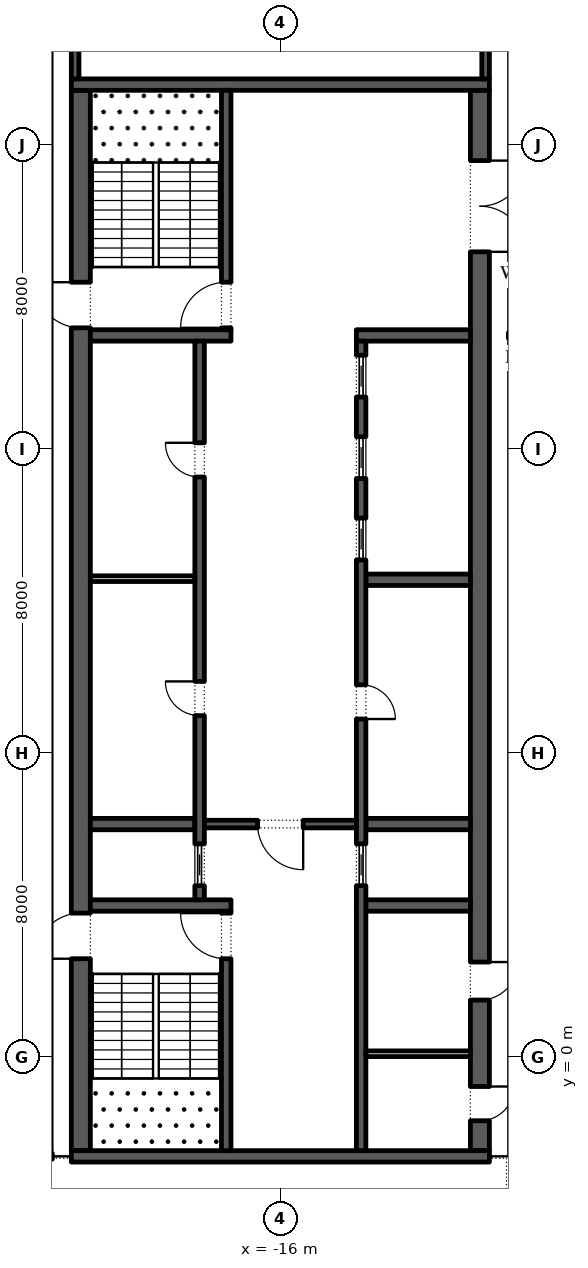
"""IFC4 building model, lengths in metres.
Left out: names, types, materials, properties, quantities, classifications, styles, units other than length and angle.
Written with IfcOpenShell. Run it as: python <this file> out.ifc"""

import sys

from ifc_helpers import new_model, si_unit, direction, frame, frame_2d, origin, place, context, subcontext, project, spatial, rectangle, extrude, element, fill, save


model = new_model("IFC4")
c1 = context("Model", 3, precision=1e-05, world=origin(), true_north=direction((0.0, 1.0)))
c2 = subcontext(c1, "Body", "Model", "MODEL_VIEW")
j1 = project(units=[si_unit("LENGTHUNIT", "METRE"), si_unit("PLANEANGLEUNIT", "RADIAN")], contexts=[c1])
p1 = place(None, origin())
s1 = spatial("IfcSite", under=j1, at=p1, CompositionType="ELEMENT")
p2 = place(p1, origin())
s2 = spatial("IfcBuilding", under=s1, at=p2, CompositionType="ELEMENT")
p3 = place(p2, frame((0.0, 0.0, 338.4)))
s3 = spatial("IfcBuildingStorey", under=s2, at=p3, CompositionType="ELEMENT", Elevation=338.4)
p4 = place(p3, frame((-21.25, -2.45, 0.0), z_axis=(0.0, 0.0, 1.0), x_axis=(0.0, 1.0, 0.0)))
e1 = element("IfcWall", 1, at=p4, inside=s3, PredefinedType="SHEAR", context=c2, shape_type="SweptSolid", body=[
    extrude(rectangle(XDim=27.9, YDim=0.5, at=frame_2d((13.95, 0.0))), origin(), (0.0, 0.0, 1.0), 4.0),
])
p5 = place(p4, frame((5.05, 0.0, 0.0)))
e2 = element("IfcOpeningElement", 2, at=p5, cuts=e1, PredefinedType="OPENING", context=c2, shape_type="SweptSolid", body=[
    extrude(rectangle(XDim=1.2, YDim=2.1, at=frame_2d((0.6, 1.05))), frame((0.0, 0.26, 0.0), z_axis=(0.0, -1.0, 0.0), x_axis=(1.0, 0.0, 0.0)), (0.0, 0.0, 1.0), 0.52),
])
p6 = place(p4, frame((21.65, 0.0, 0.0)))
e3 = element("IfcOpeningElement", 3, at=p6, cuts=e1, PredefinedType="OPENING", context=c2, shape_type="SweptSolid", body=[
    extrude(rectangle(XDim=1.2, YDim=2.1, at=frame_2d((0.6, 1.05))), frame((0.0, 0.26, 0.0), z_axis=(0.0, -1.0, 0.0), x_axis=(1.0, 0.0, 0.0)), (0.0, 0.0, 1.0), 0.52),
])
p7 = place(p3, frame((-10.75, -2.45, 0.0), z_axis=(0.0, 0.0, 1.0), x_axis=(0.0, 1.0, 0.0)))
e4 = element("IfcWall", 4, at=p7, inside=s3, PredefinedType="SHEAR", context=c2, shape_type="SweptSolid", body=[
    extrude(rectangle(XDim=27.9, YDim=0.5, at=frame_2d((13.95, 0.0))), origin(), (0.0, 0.0, 1.0), 4.0),
])
p8 = place(p7, frame((23.65, 0.0, 0.0)))
e5 = element("IfcOpeningElement", 5, at=p8, cuts=e4, PredefinedType="OPENING", context=c2, shape_type="SweptSolid", body=[
    extrude(rectangle(XDim=2.4, YDim=2.1, at=frame_2d((1.2, 1.05))), frame((0.0, 0.26, 0.0), z_axis=(0.0, -1.0, 0.0), x_axis=(1.0, 0.0, 0.0)), (0.0, 0.0, 1.0), 0.52),
])
p9 = place(p7, frame((0.788, 0.0, 0.0)))
e6 = element("IfcOpeningElement", 6, at=p9, cuts=e4, PredefinedType="OPENING", context=c2, shape_type="SweptSolid", body=[
    extrude(rectangle(XDim=0.9, YDim=2.1, at=frame_2d((0.45, 1.05))), frame((0.0, 0.26, 0.0), z_axis=(0.0, -1.0, 0.0), x_axis=(1.0, 0.0, 0.0)), (0.0, 0.0, 1.0), 0.52),
])
p10 = place(p7, frame((3.962, 0.0, 0.0)))
e7 = element("IfcOpeningElement", 7, at=p10, cuts=e4, PredefinedType="OPENING", context=c2, shape_type="SweptSolid", body=[
    extrude(rectangle(XDim=1.0, YDim=2.1, at=frame_2d((0.5, 1.05))), frame((0.0, 0.26, 0.0), z_axis=(0.0, -1.0, 0.0), x_axis=(1.0, 0.0, 0.0)), (0.0, 0.0, 1.0), 0.52),
])
for number, where, z_axis, x_axis in (
    (8, (-21.5, -2.6, 0.0), (0.0, 0.0, 1.0), (1.0, 0.0, 0.0)),
    (9, (-21.5, 25.6, 0.0), (0.0, 0.0, 1.0), (1.0, 0.0, 0.0)),
):
    element("IfcWall", number, at=place(p3, frame(where, z_axis=z_axis, x_axis=x_axis)), inside=s3, PredefinedType="SHEAR", context=c2, shape_type="SweptSolid", body=[
        extrude(rectangle(XDim=11.0, YDim=0.3, at=frame_2d((5.5, 0.0))), origin(), (0.0, 0.0, 1.0), 4.0),
    ])
p11 = place(p3, frame((-21.0, 4.0, 0.0), z_axis=(0.0, 0.0, 1.0), x_axis=(1.0, 0.0, 0.0)))
e10 = element("IfcWall", 10, at=p11, inside=s3, PredefinedType="SHEAR", context=c2, shape_type="SweptSolid", body=[
    extrude(rectangle(XDim=3.7, YDim=0.3, at=frame_2d((1.85, 0.0))), origin(), (0.0, 0.0, 1.0), 4.0),
])
p12 = place(p3, frame((-17.425, -2.45, 0.0), z_axis=(0.0, 0.0, 1.0), x_axis=(0.0, 1.0, 0.0)))
e11 = element("IfcWall", 11, at=p12, inside=s3, PredefinedType="SHEAR", context=c2, shape_type="SweptSolid", body=[
    extrude(rectangle(XDim=6.3, YDim=0.25, at=frame_2d((3.15, 0.0))), origin(), (0.0, 0.0, 1.0), 4.0),
])
p13 = place(p12, frame((5.05, 0.0, 0.0)))
e12 = element("IfcOpeningElement", 12, at=p13, cuts=e11, PredefinedType="OPENING", context=c2, shape_type="SweptSolid", body=[
    extrude(rectangle(XDim=1.2, YDim=2.1, at=frame_2d((0.6, 1.05))), frame((0.0, 0.135, 0.0), z_axis=(0.0, -1.0, 0.0), x_axis=(1.0, 0.0, 0.0)), (0.0, 0.0, 1.0), 0.27),
])
p14 = place(p3, frame((-21.0, 19.0, 0.0), z_axis=(0.0, 0.0, 1.0), x_axis=(1.0, 0.0, 0.0)))
e13 = element("IfcWall", 13, at=p14, inside=s3, PredefinedType="SHEAR", context=c2, shape_type="SweptSolid", body=[
    extrude(rectangle(XDim=3.7, YDim=0.3, at=frame_2d((1.85, 0.0))), origin(), (0.0, 0.0, 1.0), 4.0),
])
p15 = place(p3, frame((-17.425, 19.15, 0.0), z_axis=(0.0, 0.0, 1.0), x_axis=(0.0, 1.0, 0.0)))
e14 = element("IfcWall", 14, at=p15, inside=s3, PredefinedType="SHEAR", context=c2, shape_type="SweptSolid", body=[
    extrude(rectangle(XDim=6.3, YDim=0.25, at=frame_2d((3.15, 0.0))), origin(), (0.0, 0.0, 1.0), 4.0),
])
p16 = place(p15, frame((0.05, 0.0, 0.0)))
e15 = element("IfcOpeningElement", 15, at=p16, cuts=e14, PredefinedType="OPENING", context=c2, shape_type="SweptSolid", body=[
    extrude(rectangle(XDim=1.2, YDim=2.1, at=frame_2d((0.6, 1.05))), frame((0.0, 0.135, 0.0), z_axis=(0.0, -1.0, 0.0), x_axis=(1.0, 0.0, 0.0)), (0.0, 0.0, 1.0), 0.27),
])
p17 = place(p3, frame((-21.0, 6.143, 0.0), z_axis=(0.0, 0.0, 1.0), x_axis=(1.0, 0.0, 0.0)))
e16 = element("IfcWall", 16, at=p17, inside=s3, PredefinedType="SHEAR", context=c2, shape_type="SweptSolid", body=[
    extrude(rectangle(XDim=2.75, YDim=0.3, at=frame_2d((1.375, 0.0))), origin(), (0.0, 0.0, 1.0), 4.0),
])
p18 = place(p3, frame((-18.125, 4.15, 0.0), z_axis=(0.0, 0.0, 1.0), x_axis=(0.0, 1.0, 0.0)))
e17 = element("IfcWall", 17, at=p18, inside=s3, PredefinedType="SHEAR", context=c2, shape_type="SweptSolid", body=[
    extrude(rectangle(XDim=14.7, YDim=0.25, at=frame_2d((7.35, 0.0))), origin(), (0.0, 0.0, 1.0), 4.0),
])
p19 = place(p18, frame((4.846, 0.0, 0.0)))
e18 = element("IfcOpeningElement", 18, at=p19, cuts=e17, PredefinedType="OPENING", context=c2, shape_type="SweptSolid", body=[
    extrude(rectangle(XDim=0.9, YDim=2.1, at=frame_2d((0.45, 1.05))), frame((0.0, 0.135, 0.0), z_axis=(0.0, -1.0, 0.0), x_axis=(1.0, 0.0, 0.0)), (0.0, 0.0, 1.0), 0.27),
])
p20 = place(p18, frame((11.125, 0.0, 0.0)))
e19 = element("IfcOpeningElement", 19, at=p20, cuts=e17, PredefinedType="OPENING", context=c2, shape_type="SweptSolid", body=[
    extrude(rectangle(XDim=0.9, YDim=2.1, at=frame_2d((0.45, 1.05))), frame((0.0, 0.135, 0.0), z_axis=(0.0, -1.0, 0.0), x_axis=(1.0, 0.0, 0.0)), (0.0, 0.0, 1.0), 0.27),
])
p21 = place(p18, frame((0.371, 0.0, 0.0)))
e20 = element("IfcOpeningElement", 20, at=p21, cuts=e17, PredefinedType="OPENING", context=c2, shape_type="SweptSolid", body=[
    extrude(rectangle(XDim=1.1, YDim=2.1, at=frame_2d((0.55, 1.05))), frame((0.0, 0.135, 0.0), z_axis=(0.0, -1.0, 0.0), x_axis=(1.0, 0.0, 0.0)), (0.0, 0.0, 1.0), 0.27),
])
p22 = place(p3, frame((-21.0, 12.6, 0.0), z_axis=(0.0, 0.0, 1.0), x_axis=(1.0, 0.0, 0.0)))
e21 = element("IfcWall", 21, at=p22, inside=s3, PredefinedType="PARTITIONING", context=c2, shape_type="SweptSolid", body=[
    extrude(rectangle(XDim=2.75, YDim=0.15, at=frame_2d((1.375, 0.0))), origin(), (0.0, 0.0, 1.0), 4.0),
])
p23 = place(p3, frame((-14.0, 4.0, 0.0), z_axis=(0.0, 0.0, 1.0), x_axis=(1.0, 0.0, 0.0)))
e22 = element("IfcWall", 22, at=p23, inside=s3, PredefinedType="SHEAR", context=c2, shape_type="SweptSolid", body=[
    extrude(rectangle(XDim=3.0, YDim=0.3, at=frame_2d((1.5, 0.0))), origin(), (0.0, 0.0, 1.0), 4.0),
])
for number, where, z_axis, x_axis in (
    (23, (-13.75, 6.143, 0.0), (0.0, 0.0, 1.0), (1.0, 0.0, 0.0)),
    (24, (-13.75, 12.571, 0.0), (0.0, 0.0, 1.0), (1.0, 0.0, 0.0)),
):
    element("IfcWall", number, at=place(p3, frame(where, z_axis=z_axis, x_axis=x_axis)), inside=s3, PredefinedType="SHEAR", context=c2, shape_type="SweptSolid", body=[
        extrude(rectangle(XDim=2.75, YDim=0.3, at=frame_2d((1.375, 0.0))), origin(), (0.0, 0.0, 1.0), 4.0),
    ])
p24 = place(p3, frame((-14.0, 19.0, 0.0), z_axis=(0.0, 0.0, 1.0), x_axis=(1.0, 0.0, 0.0)))
e25 = element("IfcWall", 25, at=p24, inside=s3, PredefinedType="SHEAR", context=c2, shape_type="SweptSolid", body=[
    extrude(rectangle(XDim=3.0, YDim=0.3, at=frame_2d((1.5, 0.0))), origin(), (0.0, 0.0, 1.0), 4.0),
])
p25 = place(p3, frame((-13.875, -2.45, 0.0), z_axis=(0.0, 0.0, 1.0), x_axis=(0.0, 1.0, 0.0)))
e26 = element("IfcWall", 26, at=p25, inside=s3, PredefinedType="SHEAR", context=c2, shape_type="SweptSolid", body=[
    extrude(rectangle(XDim=21.3, YDim=0.25, at=frame_2d((10.65, 0.0))), origin(), (0.0, 0.0, 1.0), 4.0),
])
p26 = place(p25, frame((11.357, 0.0, 0.0)))
e27 = element("IfcOpeningElement", 27, at=p26, cuts=e26, PredefinedType="OPENING", context=c2, shape_type="SweptSolid", body=[
    extrude(rectangle(XDim=0.9, YDim=2.1, at=frame_2d((0.45, 1.05))), frame((0.0, 0.135, 0.0), z_axis=(0.0, -1.0, 0.0), x_axis=(1.0, 0.0, 0.0)), (0.0, 0.0, 1.0), 0.27),
])
p27 = place(p25, frame((6.971, 0.0, 0.0)))
e28 = element("IfcOpeningElement", 28, at=p27, cuts=e26, PredefinedType="OPENING", context=c2, shape_type="SweptSolid", body=[
    extrude(rectangle(XDim=1.1, YDim=2.1, at=frame_2d((0.55, 1.05))), frame((0.0, 0.135, 0.0), z_axis=(0.0, -1.0, 0.0), x_axis=(1.0, 0.0, 0.0)), (0.0, 0.0, 1.0), 0.27),
])
p28 = place(p25, frame((15.543, 0.0, 0.0)))
e29 = element("IfcOpeningElement", 29, at=p28, cuts=e26, PredefinedType="OPENING", context=c2, shape_type="SweptSolid", body=[
    extrude(rectangle(XDim=1.1, YDim=2.1, at=frame_2d((0.55, 1.05))), frame((0.0, 0.135, 0.0), z_axis=(0.0, -1.0, 0.0), x_axis=(1.0, 0.0, 0.0)), (0.0, 0.0, 1.0), 0.27),
])
p29 = place(p25, frame((17.686, 0.0, 0.0)))
e30 = element("IfcOpeningElement", 30, at=p29, cuts=e26, PredefinedType="OPENING", context=c2, shape_type="SweptSolid", body=[
    extrude(rectangle(XDim=1.1, YDim=2.1, at=frame_2d((0.55, 1.05))), frame((0.0, 0.135, 0.0), z_axis=(0.0, -1.0, 0.0), x_axis=(1.0, 0.0, 0.0)), (0.0, 0.0, 1.0), 0.27),
])
p30 = place(p25, frame((19.829, 0.0, 0.0)))
e31 = element("IfcOpeningElement", 31, at=p30, cuts=e26, PredefinedType="OPENING", context=c2, shape_type="SweptSolid", body=[
    extrude(rectangle(XDim=1.1, YDim=2.1, at=frame_2d((0.55, 1.05))), frame((0.0, 0.135, 0.0), z_axis=(0.0, -1.0, 0.0), x_axis=(1.0, 0.0, 0.0)), (0.0, 0.0, 1.0), 0.27),
])
p31 = place(p3, frame((-18.0, 6.143, 0.0), z_axis=(0.0, 0.0, 1.0), x_axis=(1.0, 0.0, 0.0)))
e32 = element("IfcWall", 32, at=p31, inside=s3, PredefinedType="SHEAR", context=c2, shape_type="SweptSolid", body=[
    extrude(rectangle(XDim=4.0, YDim=0.2, at=frame_2d((2.0, 0.0))), origin(), (0.0, 0.0, 1.0), 4.0),
])
p32 = place(p31, frame((1.4, 0.0, 0.0)))
e33 = element("IfcOpeningElement", 33, at=p32, cuts=e32, PredefinedType="OPENING", context=c2, shape_type="SweptSolid", body=[
    extrude(rectangle(XDim=1.2, YDim=2.1, at=frame_2d((0.6, 1.05))), frame((0.0, 0.11, 0.0), z_axis=(0.0, -1.0, 0.0), x_axis=(1.0, 0.0, 0.0)), (0.0, 0.0, 1.0), 0.22),
])
p33 = place(p3, frame((-13.75, 0.1, 0.0), z_axis=(0.0, 0.0, 1.0), x_axis=(1.0, 0.0, 0.0)))
e34 = element("IfcWall", 34, at=p33, inside=s3, PredefinedType="PARTITIONING", context=c2, shape_type="SweptSolid", body=[
    extrude(rectangle(XDim=2.75, YDim=0.15, at=frame_2d((1.375, 0.0))), origin(), (0.0, 0.0, 1.0), 4.0),
])
p34 = place(p3, frame((-21.4, 25.75, 0.0), z_axis=(0.0, 0.0, 1.0), x_axis=(0.0, 1.0, 0.0)))
e35 = element("IfcWall", 35, at=p34, inside=s3, PredefinedType="SHEAR", context=c2, shape_type="SweptSolid", body=[
    extrude(rectangle(XDim=15.05, YDim=0.2, at=frame_2d((7.525, 0.0))), origin(), (0.0, 0.0, 1.0), 4.0),
])
p35 = place(p3, frame((-10.6, 25.75, 0.0), z_axis=(0.0, 0.0, 1.0), x_axis=(0.0, 1.0, 0.0)))
e36 = element("IfcWall", 36, at=p35, inside=s3, PredefinedType="SHEAR", context=c2, shape_type="SweptSolid", body=[
    extrude(rectangle(XDim=15.05, YDim=0.2, at=frame_2d((7.525, 0.0))), origin(), (0.0, 0.0, 1.0), 4.0),
])
p36 = place(p35, frame((7.075, 0.0, 0.0)))
e37 = element("IfcOpeningElement", 37, at=p36, cuts=e36, PredefinedType="OPENING", context=c2, shape_type="SweptSolid", body=[
    extrude(rectangle(XDim=0.9, YDim=2.1, at=frame_2d((0.45, 1.05))), frame((0.0, 0.11, 0.0), z_axis=(0.0, -1.0, 0.0), x_axis=(1.0, 0.0, 0.0)), (0.0, 0.0, 1.0), 0.22),
])
p37 = place(p3, frame((-10.0, 19.0, 0.0), z_axis=(0.0, 0.0, 1.0), x_axis=(1.0, 0.0, 0.0)))
e38 = element("IfcWall", 38, at=p37, inside=s3, PredefinedType="PARTITIONING", context=c2, shape_type="SweptSolid", body=[
    extrude(rectangle(XDim=1.515, YDim=0.15, at=frame_2d((0.757, 0.0))), origin(), (0.0, 0.0, 1.0), 4.0),
])
p38 = place(p37, frame((0.258, 0.0, 0.0)))
e39 = element("IfcOpeningElement", 39, at=p38, cuts=e38, PredefinedType="OPENING", context=c2, shape_type="SweptSolid", body=[
    extrude(rectangle(XDim=1.0, YDim=2.1, at=frame_2d((0.5, 1.05))), frame((0.0, 0.085, 0.0), z_axis=(0.0, -1.0, 0.0), x_axis=(1.0, 0.0, 0.0)), (0.0, 0.0, 1.0), 0.17),
])
p39 = place(p19, origin())
e40 = element("IfcDoor", 40, at=p39, inside=s3, OperationType="SINGLE_SWING_LEFT", PredefinedType="DOOR", context=c2, shape_type="SweptSolid", body=[
    extrude(rectangle(XDim=0.9, YDim=2.1, at=frame_2d((0.45, 1.05))), frame((0.0, 0.125, 0.0), z_axis=(0.0, -1.0, 0.0), x_axis=(1.0, 0.0, 0.0)), (0.0, 0.0, 1.0), 0.05),
])
fill(e18, e40)
p40 = place(p20, origin())
e41 = element("IfcDoor", 41, at=p40, inside=s3, OperationType="SINGLE_SWING_LEFT", PredefinedType="DOOR", context=c2, shape_type="SweptSolid", body=[
    extrude(rectangle(XDim=0.9, YDim=2.1, at=frame_2d((0.45, 1.05))), frame((0.0, 0.125, 0.0), z_axis=(0.0, -1.0, 0.0), x_axis=(1.0, 0.0, 0.0)), (0.0, 0.0, 1.0), 0.05),
])
fill(e19, e41)
p41 = place(p21, origin())
e42 = element("IfcDoor", 42, at=p41, inside=s3, OperationType="SLIDING_TO_LEFT", PredefinedType="DOOR", context=c2, shape_type="SweptSolid", body=[
    extrude(rectangle(XDim=1.1, YDim=2.1, at=frame_2d((0.55, 1.05))), frame((0.0, 0.025, 0.0), z_axis=(0.0, -1.0, 0.0), x_axis=(1.0, 0.0, 0.0)), (0.0, 0.0, 1.0), 0.05),
])
fill(e20, e42)
p42 = place(p26, frame((0.9, -0.2, 0.0), z_axis=(0.0, 0.0, 1.0), x_axis=(-1.0, 0.0, 0.0)))
e43 = element("IfcDoor", 43, at=p42, inside=s3, OperationType="SINGLE_SWING_LEFT", PredefinedType="DOOR", context=c2, shape_type="SweptSolid", body=[
    extrude(rectangle(XDim=0.9, YDim=2.1, at=frame_2d((0.45, 1.05))), frame((0.0, -0.075, 0.0), z_axis=(0.0, -1.0, 0.0), x_axis=(1.0, 0.0, 0.0)), (0.0, 0.0, 1.0), 0.05),
])
fill(e27, e43)
p43 = place(p27, origin())
e44 = element("IfcDoor", 44, at=p43, inside=s3, OperationType="SLIDING_TO_LEFT", PredefinedType="DOOR", context=c2, shape_type="SweptSolid", body=[
    extrude(rectangle(XDim=1.1, YDim=2.1, at=frame_2d((0.55, 1.05))), frame((0.0, 0.025, 0.0), z_axis=(0.0, -1.0, 0.0), x_axis=(1.0, 0.0, 0.0)), (0.0, 0.0, 1.0), 0.05),
])
fill(e28, e44)
p44 = place(p28, origin())
e45 = element("IfcDoor", 45, at=p44, inside=s3, OperationType="SLIDING_TO_LEFT", PredefinedType="DOOR", context=c2, shape_type="SweptSolid", body=[
    extrude(rectangle(XDim=1.1, YDim=2.1, at=frame_2d((0.55, 1.05))), frame((0.0, 0.025, 0.0), z_axis=(0.0, -1.0, 0.0), x_axis=(1.0, 0.0, 0.0)), (0.0, 0.0, 1.0), 0.05),
])
fill(e29, e45)
p45 = place(p29, origin())
e46 = element("IfcDoor", 46, at=p45, inside=s3, OperationType="SLIDING_TO_LEFT", PredefinedType="DOOR", context=c2, shape_type="SweptSolid", body=[
    extrude(rectangle(XDim=1.1, YDim=2.1, at=frame_2d((0.55, 1.05))), frame((0.0, 0.025, 0.0), z_axis=(0.0, -1.0, 0.0), x_axis=(1.0, 0.0, 0.0)), (0.0, 0.0, 1.0), 0.05),
])
fill(e30, e46)
p46 = place(p30, origin())
e47 = element("IfcDoor", 47, at=p46, inside=s3, OperationType="SLIDING_TO_LEFT", PredefinedType="DOOR", context=c2, shape_type="SweptSolid", body=[
    extrude(rectangle(XDim=1.1, YDim=2.1, at=frame_2d((0.55, 1.05))), frame((0.0, 0.025, 0.0), z_axis=(0.0, -1.0, 0.0), x_axis=(1.0, 0.0, 0.0)), (0.0, 0.0, 1.0), 0.05),
])
fill(e31, e47)
p47 = place(p32, frame((1.2, 0.0, 0.0), z_axis=(0.0, 0.0, 1.0), x_axis=(-1.0, 0.0, 0.0)))
e48 = element("IfcDoor", 48, at=p47, inside=s3, OperationType="SINGLE_SWING_RIGHT", PredefinedType="DOOR", context=c2, shape_type="SweptSolid", body=[
    extrude(rectangle(XDim=1.2, YDim=2.1, at=frame_2d((0.6, 1.05))), frame((0.0, 0.025, 0.0), z_axis=(0.0, -1.0, 0.0), x_axis=(1.0, 0.0, 0.0)), (0.0, 0.0, 1.0), 0.05),
])
fill(e33, e48)
p48 = place(p8, frame((2.4, 0.0, 0.0), z_axis=(0.0, 0.0, 1.0), x_axis=(-1.0, 0.0, 0.0)))
e49 = element("IfcDoor", 49, at=p48, inside=s3, OperationType="DOUBLE_DOOR_SINGLE_SWING", PredefinedType="DOOR", context=c2, shape_type="SweptSolid", body=[
    extrude(rectangle(XDim=2.4, YDim=2.1, at=frame_2d((1.2, 1.05))), frame((0.0, 0.025, 0.0), z_axis=(0.0, -1.0, 0.0), x_axis=(1.0, 0.0, 0.0)), (0.0, 0.0, 1.0), 0.05),
])
fill(e5, e49)
p49 = place(p13, origin())
e50 = element("IfcDoor", 50, at=p49, inside=s3, OperationType="SINGLE_SWING_LEFT", PredefinedType="DOOR", context=c2, shape_type="SweptSolid", body=[
    extrude(rectangle(XDim=1.2, YDim=2.1, at=frame_2d((0.6, 1.05))), frame((0.0, 0.025, 0.0), z_axis=(0.0, -1.0, 0.0), x_axis=(1.0, 0.0, 0.0)), (0.0, 0.0, 1.0), 0.05),
])
fill(e12, e50)
p50 = place(p5, origin())
e51 = element("IfcDoor", 51, at=p50, inside=s3, OperationType="SINGLE_SWING_RIGHT", PredefinedType="DOOR", context=c2, shape_type="SweptSolid", body=[
    extrude(rectangle(XDim=1.2, YDim=2.1, at=frame_2d((0.6, 1.05))), frame((0.0, 0.025, 0.0), z_axis=(0.0, -1.0, 0.0), x_axis=(1.0, 0.0, 0.0)), (0.0, 0.0, 1.0), 0.05),
])
fill(e2, e51)
p51 = place(p16, origin())
e52 = element("IfcDoor", 52, at=p51, inside=s3, OperationType="SINGLE_SWING_RIGHT", PredefinedType="DOOR", context=c2, shape_type="SweptSolid", body=[
    extrude(rectangle(XDim=1.2, YDim=2.1, at=frame_2d((0.6, 1.05))), frame((0.0, 0.025, 0.0), z_axis=(0.0, -1.0, 0.0), x_axis=(1.0, 0.0, 0.0)), (0.0, 0.0, 1.0), 0.05),
])
fill(e15, e52)
p52 = place(p6, origin())
e53 = element("IfcDoor", 53, at=p52, inside=s3, OperationType="SINGLE_SWING_LEFT", PredefinedType="DOOR", context=c2, shape_type="SweptSolid", body=[
    extrude(rectangle(XDim=1.2, YDim=2.1, at=frame_2d((0.6, 1.05))), frame((0.0, 0.025, 0.0), z_axis=(0.0, -1.0, 0.0), x_axis=(1.0, 0.0, 0.0)), (0.0, 0.0, 1.0), 0.05),
])
fill(e3, e53)
p53 = place(p9, frame((0.9, 0.45, 0.0), z_axis=(0.0, 0.0, 1.0), x_axis=(-1.0, 0.0, 0.0)))
e54 = element("IfcDoor", 54, at=p53, inside=s3, OperationType="SINGLE_SWING_RIGHT", PredefinedType="DOOR", context=c2, shape_type="SweptSolid", body=[
    extrude(rectangle(XDim=0.9, YDim=2.1, at=frame_2d((0.45, 1.05))), frame((0.0, 0.25, 0.0), z_axis=(0.0, -1.0, 0.0), x_axis=(1.0, 0.0, 0.0)), (0.0, 0.0, 1.0), 0.05),
])
fill(e6, e54)
p54 = place(p10, frame((1.0, 0.45, 0.0), z_axis=(0.0, 0.0, 1.0), x_axis=(-1.0, 0.0, 0.0)))
e55 = element("IfcDoor", 55, at=p54, inside=s3, OperationType="SINGLE_SWING_RIGHT", PredefinedType="DOOR", context=c2, shape_type="SweptSolid", body=[
    extrude(rectangle(XDim=1.0, YDim=2.1, at=frame_2d((0.5, 1.05))), frame((0.0, 0.25, 0.0), z_axis=(0.0, -1.0, 0.0), x_axis=(1.0, 0.0, 0.0)), (0.0, 0.0, 1.0), 0.05),
])
fill(e7, e55)
save(model, sys.argv[1])
